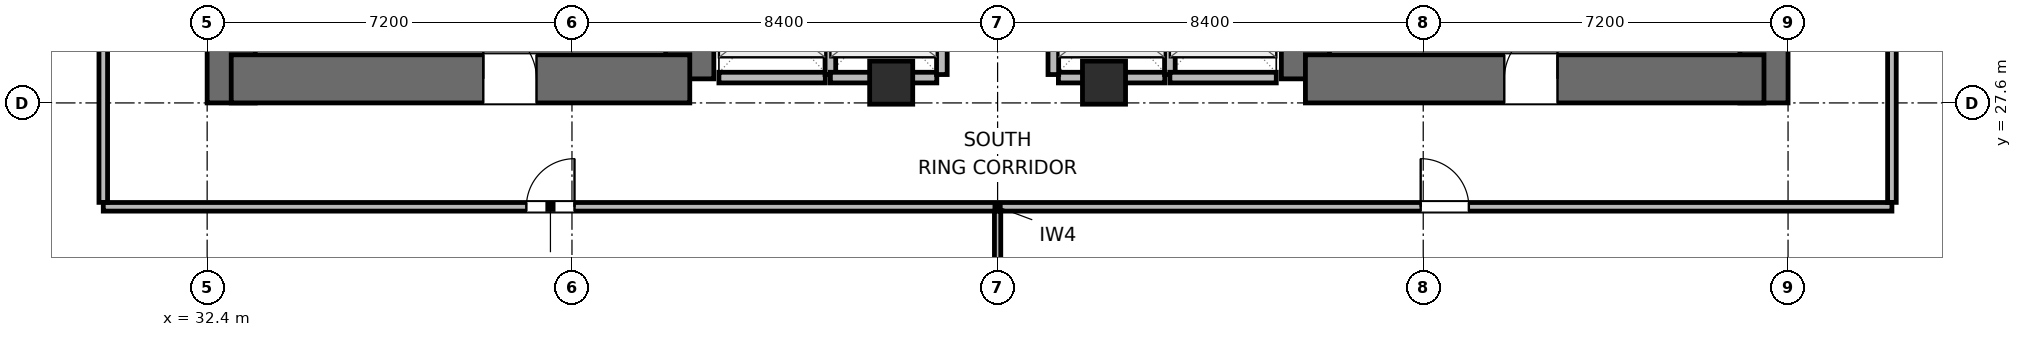
"""IFC4 building model, lengths in metres.
Left out: names, types, materials, properties, quantities, classifications, styles, units other than length and angle.
Written with IfcOpenShell. Run it as: python <this file> out.ifc"""

import sys

from ifc_helpers import new_model, si_unit, direction, frame, frame_2d, origin, origin_2d, place, context, subcontext, project, spatial, rectangle, extrude, element, fill, save


model = new_model("IFC4")
c1 = context("Model", 3, precision=1e-05, world=origin(), true_north=direction((0.0, 1.0)))
c2 = subcontext(c1, "Body", "Model", "MODEL_VIEW")
j1 = project(units=[si_unit("LENGTHUNIT", "METRE"), si_unit("PLANEANGLEUNIT", "RADIAN")], contexts=[c1])
p1 = place(None, origin())
s1 = spatial("IfcSite", under=j1, at=p1, CompositionType="ELEMENT")
p2 = place(p1, origin())
s2 = spatial("IfcBuilding", under=s1, at=p2, CompositionType="ELEMENT")
p3 = place(p2, frame((0.0, 0.0, 29.4)))
s3 = spatial("IfcBuildingStorey", under=s2, at=p3, CompositionType="ELEMENT", Elevation=29.4)
p4 = place(p3, frame((32.875, 27.6, 0.0), z_axis=(0.0, 0.0, 1.0), x_axis=(0.0, 1.0, 0.0)))
e1 = element("IfcWall", 1, at=p4, inside=s3, PredefinedType="SHEAR", context=c2, shape_type="SweptSolid", body=[
    extrude(rectangle(XDim=16.8, YDim=0.95, at=frame_2d((8.4, 0.0))), origin(), (0.0, 0.0, 1.0), 3.9),
])
p5 = place(p3, frame((41.925, 28.075, 0.0), z_axis=(0.0, 0.0, 1.0), x_axis=(0.0, 1.0, 0.0)))
e2 = element("IfcWall", 2, at=p5, inside=s3, PredefinedType="SHEAR", context=c2, shape_type="SweptSolid", body=[
    extrude(rectangle(XDim=6.325, YDim=0.95, at=frame_2d((3.163, 0.0))), origin(), (0.0, 0.0, 1.0), 3.9),
])
p6 = place(p3, frame((32.875, 28.075, 0.0), z_axis=(0.0, 0.0, 1.0), x_axis=(1.0, 0.0, 0.0)))
e3 = element("IfcWall", 3, at=p6, inside=s3, PredefinedType="SHEAR", context=c2, shape_type="SweptSolid", body=[
    extrude(rectangle(XDim=9.05, YDim=0.95, at=frame_2d((4.525, 0.0))), origin(), (0.0, 0.0, 1.0), 3.9),
])
p7 = place(p6, frame((4.975, 0.0, 0.0)))
e4 = element("IfcOpeningElement", 4, at=p7, cuts=e3, PredefinedType="OPENING", context=c2, shape_type="SweptSolid", body=[
    extrude(rectangle(XDim=1.05, YDim=2.04, at=frame_2d((0.525, 1.02))), frame((0.0, 0.485, 0.0), z_axis=(0.0, -1.0, 0.0), x_axis=(1.0, 0.0, 0.0)), (0.0, 0.0, 1.0), 0.97),
])
p8 = place(p3, frame((54.075, 28.075, 0.0), z_axis=(0.0, 0.0, 1.0), x_axis=(0.0, 1.0, 0.0)))
e5 = element("IfcWall", 5, at=p8, inside=s3, PredefinedType="SHEAR", context=c2, shape_type="SweptSolid", body=[
    extrude(rectangle(XDim=7.725, YDim=0.95, at=frame_2d((3.863, 0.0))), origin(), (0.0, 0.0, 1.0), 3.9),
])
p9 = place(p3, frame((63.125, 27.6, 0.0), z_axis=(0.0, 0.0, 1.0), x_axis=(0.0, 1.0, 0.0)))
e6 = element("IfcWall", 6, at=p9, inside=s3, PredefinedType="SHEAR", context=c2, shape_type="SweptSolid", body=[
    extrude(rectangle(XDim=16.8, YDim=0.95, at=frame_2d((8.4, 0.0))), origin(), (0.0, 0.0, 1.0), 3.9),
])
p10 = place(p3, frame((54.075, 28.075, 0.0), z_axis=(0.0, 0.0, 1.0), x_axis=(1.0, 0.0, 0.0)))
e7 = element("IfcWall", 7, at=p10, inside=s3, PredefinedType="SHEAR", context=c2, shape_type="SweptSolid", body=[
    extrude(rectangle(XDim=9.05, YDim=0.95, at=frame_2d((4.525, 0.0))), origin(), (0.0, 0.0, 1.0), 3.9),
])
p11 = place(p10, frame((3.925, 0.0, 0.0)))
e8 = element("IfcOpeningElement", 8, at=p11, cuts=e7, PredefinedType="OPENING", context=c2, shape_type="SweptSolid", body=[
    extrude(rectangle(XDim=1.05, YDim=2.04, at=frame_2d((0.525, 1.02))), frame((0.0, 0.485, 0.0), z_axis=(0.0, -1.0, 0.0), x_axis=(1.0, 0.0, 0.0)), (0.0, 0.0, 1.0), 0.97),
])
for number, where, z_axis, x_axis in (
    (9, (45.9, 28.0, 0.0), (0.0, 0.0, 1.0), (1.0, 0.0, 0.0)),
    (10, (50.1, 28.0, 0.0), (0.0, 0.0, 1.0), (1.0, 0.0, 0.0)),
):
    element("IfcColumn", number, at=place(p3, frame(where, z_axis=z_axis, x_axis=x_axis)), inside=s3, PredefinedType="COLUMN", context=c2, shape_type="SweptSolid", body=[
        extrude(rectangle(XDim=0.85, YDim=0.85, at=origin_2d()), origin(), (0.0, 0.0, 1.0), 3.9),
    ])
p12 = place(p3, frame((42.5, 28.1, 0.0), z_axis=(0.0, 0.0, 1.0), x_axis=(1.0, 0.0, 0.0)))
e11 = element("IfcWall", 11, at=p12, inside=s3, PredefinedType="PARTITIONING", context=c2, shape_type="SweptSolid", body=[
    extrude(rectangle(XDim=2.1, YDim=0.21, at=frame_2d((1.05, 0.0))), origin(), (0.0, 0.0, 1.0), 2.525),
])
p13 = place(p3, frame((44.7, 28.16, 0.0), z_axis=(0.0, 0.0, 1.0), x_axis=(0.0, 1.0, 0.0)))
e12 = element("IfcWall", 12, at=p13, inside=s3, PredefinedType="PARTITIONING", context=c2, shape_type="SweptSolid", body=[
    extrude(rectangle(XDim=2.28, YDim=0.21, at=frame_2d((1.14, 0.0))), origin(), (0.0, 0.0, 1.0), 3.64),
])
p14 = place(p3, frame((44.7, 28.1, 0.0), z_axis=(0.0, 0.0, 1.0), x_axis=(1.0, 0.0, 0.0)))
e13 = element("IfcWall", 13, at=p14, inside=s3, PredefinedType="PARTITIONING", context=c2, shape_type="SweptSolid", body=[
    extrude(rectangle(XDim=2.1, YDim=0.21, at=frame_2d((1.05, 0.0))), origin(), (0.0, 0.0, 1.0), 2.525),
])
p15 = place(p3, frame((46.9, 28.16, 0.0), z_axis=(0.0, 0.0, 1.0), x_axis=(0.0, 1.0, 0.0)))
e14 = element("IfcWall", 14, at=p15, inside=s3, PredefinedType="PARTITIONING", context=c2, shape_type="SweptSolid", body=[
    extrude(rectangle(XDim=2.28, YDim=0.21, at=frame_2d((1.14, 0.0))), origin(), (0.0, 0.0, 1.0), 3.64),
])
p16 = place(p3, frame((49.2, 28.1, 0.0), z_axis=(0.0, 0.0, 1.0), x_axis=(1.0, 0.0, 0.0)))
e15 = element("IfcWall", 15, at=p16, inside=s3, PredefinedType="PARTITIONING", context=c2, shape_type="SweptSolid", body=[
    extrude(rectangle(XDim=2.1, YDim=0.21, at=frame_2d((1.05, 0.0))), origin(), (0.0, 0.0, 1.0), 2.525),
])
for number, where, z_axis, x_axis in (
    (16, (49.1, 28.16, 0.0), (0.0, 0.0, 1.0), (0.0, 1.0, 0.0)),
    (17, (51.4, 28.16, 0.0), (0.0, 0.0, 1.0), (0.0, 1.0, 0.0)),
):
    element("IfcWall", number, at=place(p3, frame(where, z_axis=z_axis, x_axis=x_axis)), inside=s3, PredefinedType="PARTITIONING", context=c2, shape_type="SweptSolid", body=[
        extrude(rectangle(XDim=2.28, YDim=0.21, at=frame_2d((1.14, 0.0))), origin(), (0.0, 0.0, 1.0), 3.64),
    ])
p17 = place(p3, frame((51.4, 28.1, 0.0), z_axis=(0.0, 0.0, 1.0), x_axis=(1.0, 0.0, 0.0)))
e18 = element("IfcWall", 18, at=p17, inside=s3, PredefinedType="PARTITIONING", context=c2, shape_type="SweptSolid", body=[
    extrude(rectangle(XDim=2.1, YDim=0.21, at=frame_2d((1.05, 0.0))), origin(), (0.0, 0.0, 1.0), 2.525),
])
p18 = place(p3, frame((30.35, 25.55, 0.0), z_axis=(0.0, 0.0, 1.0), x_axis=(1.0, 0.0, 0.0)))
e19 = element("IfcWall", 19, at=p18, inside=s3, PredefinedType="PARTITIONING", context=c2, shape_type="SweptSolid", body=[
    extrude(rectangle(XDim=35.3, YDim=0.17, at=frame_2d((17.65, 0.0))), origin(), (0.0, 0.0, 1.0), 3.64),
])
p19 = place(p18, frame((8.35, 0.0, 0.0)))
e20 = element("IfcOpeningElement", 20, at=p19, cuts=e19, PredefinedType="OPENING", context=c2, shape_type="SweptSolid", body=[
    extrude(rectangle(XDim=0.95, YDim=2.04, at=frame_2d((0.475, 1.02))), frame((0.0, 0.095, 0.0), z_axis=(0.0, -1.0, 0.0), x_axis=(1.0, 0.0, 0.0)), (0.0, 0.0, 1.0), 0.19),
])
p20 = place(p18, frame((26.0, 0.0, 0.0)))
e21 = element("IfcOpeningElement", 21, at=p20, cuts=e19, PredefinedType="OPENING", context=c2, shape_type="SweptSolid", body=[
    extrude(rectangle(XDim=0.95, YDim=2.04, at=frame_2d((0.475, 1.02))), frame((0.0, 0.095, 0.0), z_axis=(0.0, -1.0, 0.0), x_axis=(1.0, 0.0, 0.0)), (0.0, 0.0, 1.0), 0.19),
])
p21 = place(p3, frame((30.35, 25.637, 0.0), z_axis=(0.0, 0.0, 1.0), x_axis=(0.0, 1.0, 0.0)))
e22 = element("IfcWall", 22, at=p21, inside=s3, PredefinedType="PARTITIONING", context=c2, shape_type="SweptSolid", body=[
    extrude(rectangle(XDim=20.726, YDim=0.17, at=frame_2d((10.363, 0.0))), origin(), (0.0, 0.0, 1.0), 3.64),
])
p22 = place(p21, frame((4.263, 0.0, 0.0)))
e23 = element("IfcOpeningElement", 23, at=p22, cuts=e22, PredefinedType="OPENING", context=c2, shape_type="SweptSolid", body=[
    extrude(rectangle(XDim=0.95, YDim=2.04, at=frame_2d((0.475, 1.02))), frame((0.0, 0.095, 0.0), z_axis=(0.0, -1.0, 0.0), x_axis=(1.0, 0.0, 0.0)), (0.0, 0.0, 1.0), 0.19),
])
p23 = place(p21, frame((14.713, 0.0, 0.0)))
e24 = element("IfcOpeningElement", 24, at=p23, cuts=e22, PredefinedType="OPENING", context=c2, shape_type="SweptSolid", body=[
    extrude(rectangle(XDim=0.95, YDim=2.04, at=frame_2d((0.475, 1.02))), frame((0.0, 0.095, 0.0), z_axis=(0.0, -1.0, 0.0), x_axis=(1.0, 0.0, 0.0)), (0.0, 0.0, 1.0), 0.19),
])
p24 = place(p3, frame((65.65, 25.637, 0.0), z_axis=(0.0, 0.0, 1.0), x_axis=(0.0, 1.0, 0.0)))
e25 = element("IfcWall", 25, at=p24, inside=s3, PredefinedType="PARTITIONING", context=c2, shape_type="SweptSolid", body=[
    extrude(rectangle(XDim=20.726, YDim=0.17, at=frame_2d((10.363, 0.0))), origin(), (0.0, 0.0, 1.0), 3.64),
])
p25 = place(p24, frame((4.163, 0.0, 0.0)))
e26 = element("IfcOpeningElement", 26, at=p25, cuts=e25, PredefinedType="OPENING", context=c2, shape_type="SweptSolid", body=[
    extrude(rectangle(XDim=0.95, YDim=2.04, at=frame_2d((0.475, 1.02))), frame((0.0, 0.095, 0.0), z_axis=(0.0, -1.0, 0.0), x_axis=(1.0, 0.0, 0.0)), (0.0, 0.0, 1.0), 0.19),
])
p26 = place(p24, frame((14.613, 0.0, 0.0)))
e27 = element("IfcOpeningElement", 27, at=p26, cuts=e25, PredefinedType="OPENING", context=c2, shape_type="SweptSolid", body=[
    extrude(rectangle(XDim=0.95, YDim=2.04, at=frame_2d((0.475, 1.02))), frame((0.0, 0.095, 0.0), z_axis=(0.0, -1.0, 0.0), x_axis=(1.0, 0.0, 0.0)), (0.0, 0.0, 1.0), 0.19),
])
p27 = place(p3, frame((48.0, 11.515, 0.0), z_axis=(0.0, 0.0, 1.0), x_axis=(0.0, 1.0, 0.0)))
e28 = element("IfcWall", 28, at=p27, inside=s3, PredefinedType="PARTITIONING", context=c2, shape_type="SweptSolid", body=[
    extrude(rectangle(XDim=13.948, YDim=0.125, at=frame_2d((6.974, 0.0))), origin(), (0.0, 0.0, 1.0), 2.93),
])
p28 = place(p7, origin())
e29 = element("IfcDoor", 29, at=p28, inside=s3, OperationType="SINGLE_SWING_LEFT", PredefinedType="DOOR", context=c2, shape_type="SweptSolid", body=[
    extrude(rectangle(XDim=1.05, YDim=2.04, at=frame_2d((0.525, 1.02))), frame((0.0, 0.025, 0.0), z_axis=(0.0, -1.0, 0.0), x_axis=(1.0, 0.0, 0.0)), (0.0, 0.0, 1.0), 0.05),
])
fill(e4, e29)
p29 = place(p11, origin())
e30 = element("IfcDoor", 30, at=p29, inside=s3, OperationType="SINGLE_SWING_RIGHT", PredefinedType="DOOR", context=c2, shape_type="SweptSolid", body=[
    extrude(rectangle(XDim=1.05, YDim=2.04, at=frame_2d((0.525, 1.02))), frame((0.0, 0.025, 0.0), z_axis=(0.0, -1.0, 0.0), x_axis=(1.0, 0.0, 0.0)), (0.0, 0.0, 1.0), 0.05),
])
fill(e8, e30)
p30 = place(p19, origin())
e31 = element("IfcDoor", 31, at=p30, inside=s3, OperationType="SINGLE_SWING_RIGHT", PredefinedType="DOOR", context=c2, shape_type="SweptSolid", body=[
    extrude(rectangle(XDim=0.95, YDim=2.04, at=frame_2d((0.475, 1.02))), frame((0.0, 0.025, 0.0), z_axis=(0.0, -1.0, 0.0), x_axis=(1.0, 0.0, 0.0)), (0.0, 0.0, 1.0), 0.05),
])
fill(e20, e31)
p31 = place(p20, origin())
e32 = element("IfcDoor", 32, at=p31, inside=s3, OperationType="SINGLE_SWING_LEFT", PredefinedType="DOOR", context=c2, shape_type="SweptSolid", body=[
    extrude(rectangle(XDim=0.95, YDim=2.04, at=frame_2d((0.475, 1.02))), frame((0.0, 0.025, 0.0), z_axis=(0.0, -1.0, 0.0), x_axis=(1.0, 0.0, 0.0)), (0.0, 0.0, 1.0), 0.05),
])
fill(e21, e32)
save(model, sys.argv[1])
